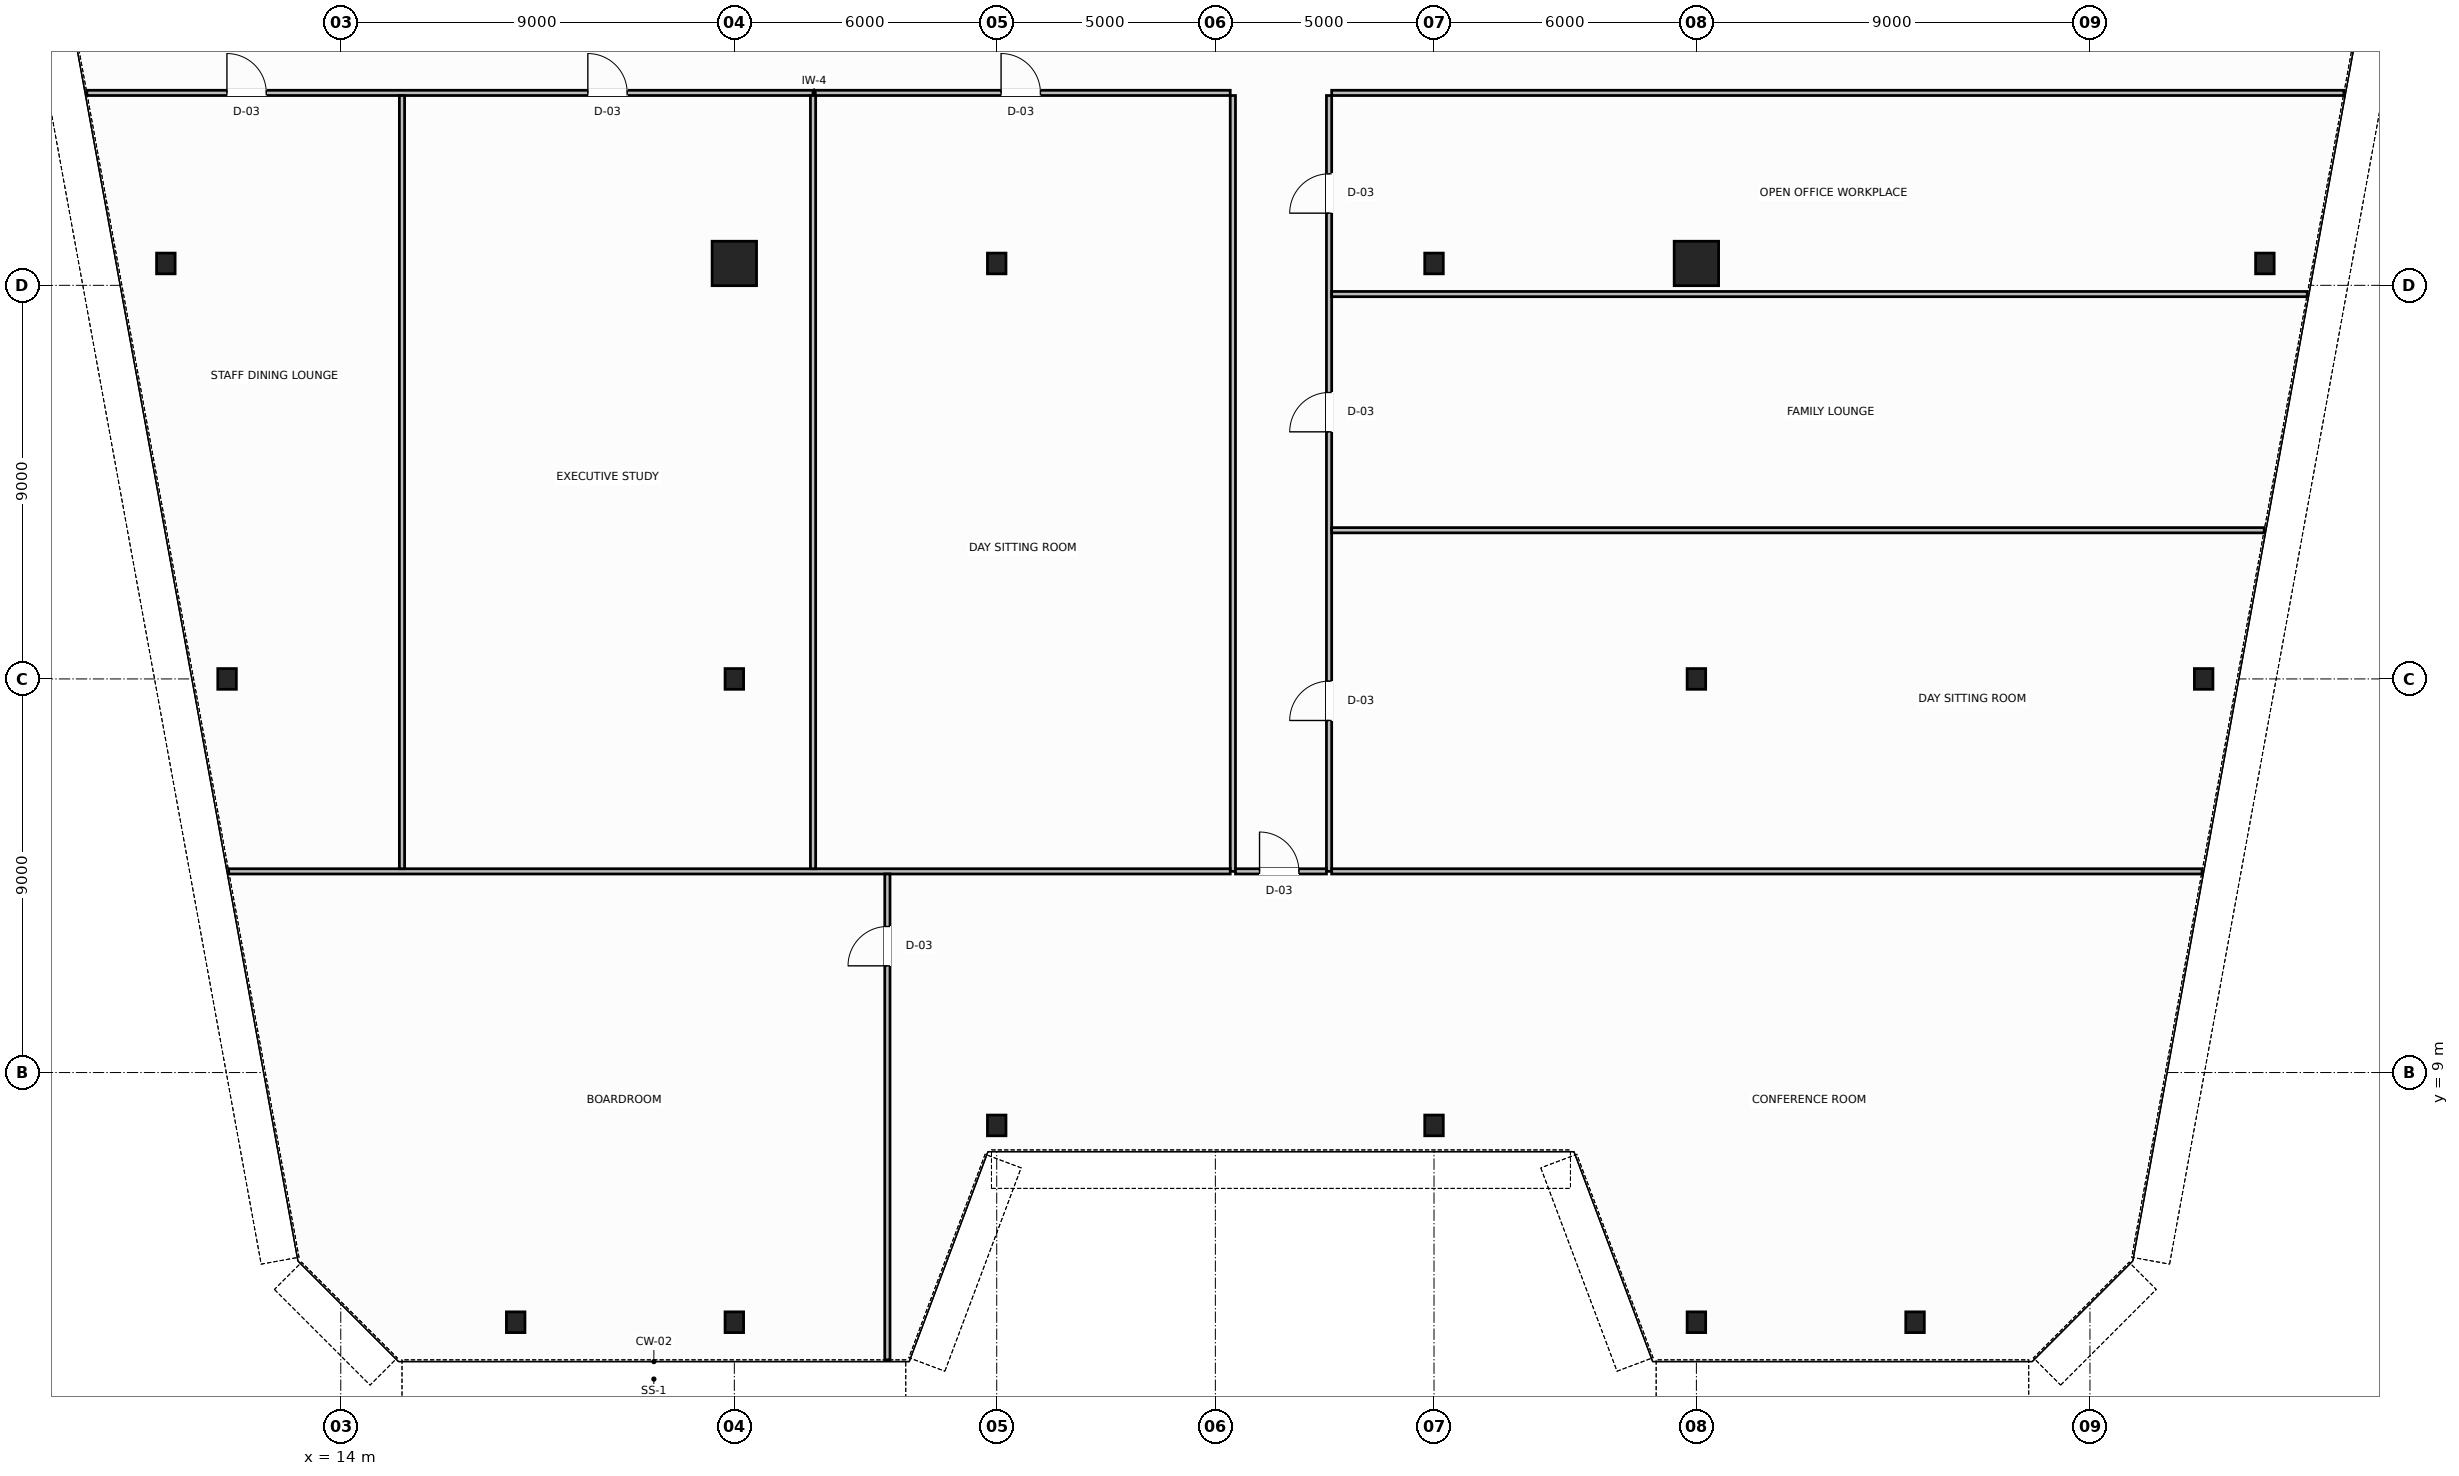
"""IFC4 building model, lengths in metres.
Left out: names, types, materials, properties, quantities, classifications, styles, units other than length and angle.
Written with IfcOpenShell. Run it as: python <this file> out.ifc"""

import sys

from ifc_helpers import new_model, si_unit, direction, frame, frame_2d, origin, origin_2d, place, context, subcontext, project, spatial, rectangle, hollow_circle, i_section, extrude, source, transform, mapped, element, fill, save


model = new_model("IFC4")
c1 = context("Model", 3, precision=1e-05, world=origin(), true_north=direction((0.0, 1.0)))
c2 = subcontext(c1, "Body", "Model", "MODEL_VIEW")
j1 = project(units=[si_unit("LENGTHUNIT", "METRE"), si_unit("PLANEANGLEUNIT", "RADIAN")], contexts=[c1])
p1 = place(None, origin())
s1 = spatial("IfcSite", under=j1, at=p1, CompositionType="ELEMENT")
p2 = place(p1, origin())
s2 = spatial("IfcBuilding", under=s1, at=p2, CompositionType="ELEMENT")
p3 = place(p2, frame((0.0, 0.0, 107.2)))
s3 = spatial("IfcBuildingStorey", under=s2, at=p3, CompositionType="ELEMENT", Elevation=107.2)
m1 = source(origin(), c2, "Body", "SweptSolid", [
    extrude(i_section(OverallWidth=0.424, OverallDepth=0.474, WebThickness=0.047, FlangeThickness=0.065, FilletRadius=0.015, at=origin_2d()), origin(), (0.0, 0.0, 1.0), 3.8),
])
for number, where, z_axis, x_axis in (
    (1, (10.0, 27.5, 0.0), (0.0, 0.0, 1.0), (1.0, 0.0, 0.0)),
    (2, (11.4, 18.0, 0.0), (0.0, 0.0, 1.0), (1.0, 0.0, 0.0)),
    (3, (58.0, 27.5, 0.0), (0.0, 0.0, 1.0), (1.0, 0.0, 0.0)),
    (4, (56.6, 18.0, 0.0), (0.0, 0.0, 1.0), (1.0, 0.0, 0.0)),
):
    element("IfcColumn", number, at=place(p3, frame(where, z_axis=z_axis, x_axis=x_axis)), inside=s3, PredefinedType="COLUMN", context=c2, shape_type="MappedRepresentation", body=[
        mapped(m1, transform((0.0, 0.0, 0.0), scale=1.0)),
    ])
m2 = source(origin(), c2, "Body", "SweptSolid", [
    extrude(hollow_circle(Radius=0.508, WallThickness=0.045, at=origin_2d()), origin(), (0.0, 0.0, 1.0), 3.8),
])
p4 = place(p3, frame((23.0, 27.5, 0.0), z_axis=(0.0, 0.0, 1.0), x_axis=(1.0, 0.0, 0.0)))
e5 = element("IfcColumn", 5, at=p4, inside=s3, PredefinedType="COLUMN", context=c2, shape_type="MappedRepresentation", body=[
    mapped(m2, transform((0.0, 0.0, 0.0), scale=1.0)),
])
m3 = source(origin(), c2, "Body", "SweptSolid", [
    extrude(i_section(OverallWidth=0.424, OverallDepth=0.474, WebThickness=0.047, FlangeThickness=0.065, FilletRadius=0.015, at=origin_2d()), origin(), (0.0, 0.0, 1.0), 3.8),
])
for number, where, z_axis, x_axis in (
    (6, (29.0, 27.5, 0.0), (0.0, 0.0, 1.0), (1.0, 0.0, 0.0)),
    (7, (39.0, 27.5, 0.0), (0.0, 0.0, 1.0), (1.0, 0.0, 0.0)),
):
    element("IfcColumn", number, at=place(p3, frame(where, z_axis=z_axis, x_axis=x_axis)), inside=s3, PredefinedType="COLUMN", context=c2, shape_type="MappedRepresentation", body=[
        mapped(m3, transform((0.0, 0.0, 0.0), scale=1.0)),
    ])
p5 = place(p3, frame((45.0, 27.5, 0.0), z_axis=(0.0, 0.0, 1.0), x_axis=(1.0, 0.0, 0.0)))
e8 = element("IfcColumn", 8, at=p5, inside=s3, PredefinedType="COLUMN", context=c2, shape_type="MappedRepresentation", body=[
    mapped(m2, transform((0.0, 0.0, 0.0), scale=1.0)),
])
for number, where, z_axis, x_axis in (
    (9, (23.0, 18.0, 0.0), (0.0, 0.0, 1.0), (1.0, 0.0, 0.0)),
    (10, (45.0, 18.0, 0.0), (0.0, 0.0, 1.0), (1.0, 0.0, 0.0)),
):
    element("IfcColumn", number, at=place(p3, frame(where, z_axis=z_axis, x_axis=x_axis)), inside=s3, PredefinedType="COLUMN", context=c2, shape_type="MappedRepresentation", body=[
        mapped(m3, transform((0.0, 0.0, 0.0), scale=1.0)),
    ])
m4 = source(origin(), c2, "Body", "SweptSolid", [
    extrude(i_section(OverallWidth=0.424, OverallDepth=0.474, WebThickness=0.047, FlangeThickness=0.065, FilletRadius=0.015, at=origin_2d()), origin(), (0.0, 0.0, 1.0), 3.744),
])
for number, where, z_axis, x_axis in (
    (11, (18.0, 3.291, 0.032), (0.0, -0.064, 0.998), (1.0, 0.0, 0.0)),
    (12, (23.0, 3.291, 0.032), (0.0, -0.064, 0.998), (1.0, 0.0, 0.0)),
    (13, (29.0, 7.791, 0.032), (0.0, -0.064, 0.998), (1.0, 0.0, 0.0)),
    (14, (39.0, 7.791, 0.032), (0.0, -0.064, 0.998), (1.0, 0.0, 0.0)),
    (15, (45.0, 3.291, 0.032), (0.0, -0.064, 0.998), (1.0, 0.0, 0.0)),
    (16, (50.0, 3.291, 0.032), (0.0, -0.064, 0.998), (1.0, 0.0, 0.0)),
):
    element("IfcColumn", number, at=place(p3, frame(where, z_axis=z_axis, x_axis=x_axis)), inside=s3, PredefinedType="COLUMN", context=c2, shape_type="MappedRepresentation", body=[
        mapped(m4, transform((0.0, 0.0, 0.0), scale=1.0)),
    ])
p6 = place(p3, frame((8.193, 31.4, 0.0), z_axis=(0.0, 0.0, 1.0), x_axis=(1.0, 0.0, 0.0)))
e17 = element("IfcWall", 17, at=p6, inside=s3, PredefinedType="PARTITIONING", context=c2, shape_type="SweptSolid", body=[
    extrude(rectangle(XDim=26.147, YDim=0.12, at=frame_2d((13.074, 0.0))), origin(), (0.0, 0.0, 1.0), 3.58),
])
p7 = place(p6, frame((3.204, 0.0, 0.0)))
e18 = element("IfcOpeningElement", 18, at=p7, cuts=e17, PredefinedType="OPENING", context=c2, shape_type="SweptSolid", body=[
    extrude(rectangle(XDim=0.9, YDim=2.15, at=frame_2d((0.45, 1.075))), frame((0.0, 0.07, 0.0), z_axis=(0.0, -1.0, 0.0), x_axis=(1.0, 0.0, 0.0)), (0.0, 0.0, 1.0), 0.14),
])
p8 = place(p6, frame((11.457, 0.0, 0.0)))
e19 = element("IfcOpeningElement", 19, at=p8, cuts=e17, PredefinedType="OPENING", context=c2, shape_type="SweptSolid", body=[
    extrude(rectangle(XDim=0.9, YDim=2.15, at=frame_2d((0.45, 1.075))), frame((0.0, 0.07, 0.0), z_axis=(0.0, -1.0, 0.0), x_axis=(1.0, 0.0, 0.0)), (0.0, 0.0, 1.0), 0.14),
])
p9 = place(p6, frame((20.907, 0.0, 0.0)))
e20 = element("IfcOpeningElement", 20, at=p9, cuts=e17, PredefinedType="OPENING", context=c2, shape_type="SweptSolid", body=[
    extrude(rectangle(XDim=0.9, YDim=2.15, at=frame_2d((0.45, 1.075))), frame((0.0, 0.07, 0.0), z_axis=(0.0, -1.0, 0.0), x_axis=(1.0, 0.0, 0.0)), (0.0, 0.0, 1.0), 0.14),
])
p10 = place(p3, frame((36.66, 31.4, 0.0), z_axis=(0.0, 0.0, 1.0), x_axis=(1.0, 0.0, 0.0)))
e21 = element("IfcWall", 21, at=p10, inside=s3, PredefinedType="PARTITIONING", context=c2, shape_type="SweptSolid", body=[
    extrude(rectangle(XDim=23.147, YDim=0.12, at=frame_2d((11.574, 0.0))), origin(), (0.0, 0.0, 1.0), 3.58),
])
p11 = place(p3, frame((34.4, 13.6, 0.0), z_axis=(0.0, 0.0, 1.0), x_axis=(0.0, 1.0, 0.0)))
e22 = element("IfcWall", 22, at=p11, inside=s3, PredefinedType="PARTITIONING", context=c2, shape_type="SweptSolid", body=[
    extrude(rectangle(XDim=17.74, YDim=0.12, at=frame_2d((8.87, 0.0))), origin(), (0.0, 0.0, 1.0), 3.58),
])
p12 = place(p3, frame((36.6, 13.6, 0.0), z_axis=(0.0, 0.0, 1.0), x_axis=(0.0, 1.0, 0.0)))
e23 = element("IfcWall", 23, at=p12, inside=s3, PredefinedType="PARTITIONING", context=c2, shape_type="SweptSolid", body=[
    extrude(rectangle(XDim=17.74, YDim=0.12, at=frame_2d((8.87, 0.0))), origin(), (0.0, 0.0, 1.0), 3.58),
])
p13 = place(p12, frame((3.45, 0.0, 0.0)))
e24 = element("IfcOpeningElement", 24, at=p13, cuts=e23, PredefinedType="OPENING", context=c2, shape_type="SweptSolid", body=[
    extrude(rectangle(XDim=0.9, YDim=2.15, at=frame_2d((0.45, 1.075))), frame((0.0, 0.07, 0.0), z_axis=(0.0, -1.0, 0.0), x_axis=(1.0, 0.0, 0.0)), (0.0, 0.0, 1.0), 0.14),
])
p14 = place(p12, frame((10.05, 0.0, 0.0)))
e25 = element("IfcOpeningElement", 25, at=p14, cuts=e23, PredefinedType="OPENING", context=c2, shape_type="SweptSolid", body=[
    extrude(rectangle(XDim=0.9, YDim=2.15, at=frame_2d((0.45, 1.075))), frame((0.0, 0.07, 0.0), z_axis=(0.0, -1.0, 0.0), x_axis=(1.0, 0.0, 0.0)), (0.0, 0.0, 1.0), 0.14),
])
p15 = place(p12, frame((15.05, 0.0, 0.0)))
e26 = element("IfcOpeningElement", 26, at=p15, cuts=e23, PredefinedType="OPENING", context=c2, shape_type="SweptSolid", body=[
    extrude(rectangle(XDim=0.9, YDim=2.15, at=frame_2d((0.45, 1.075))), frame((0.0, 0.07, 0.0), z_axis=(0.0, -1.0, 0.0), x_axis=(1.0, 0.0, 0.0)), (0.0, 0.0, 1.0), 0.14),
])
p16 = place(p3, frame((34.46, 13.6, 0.0), z_axis=(0.0, 0.0, 1.0), x_axis=(1.0, 0.0, 0.0)))
e27 = element("IfcWall", 27, at=p16, inside=s3, PredefinedType="PARTITIONING", context=c2, shape_type="SweptSolid", body=[
    extrude(rectangle(XDim=2.08, YDim=0.12, at=frame_2d((1.04, 0.0))), origin(), (0.0, 0.0, 1.0), 3.58),
])
p17 = place(p16, frame((0.55, 0.0, 0.0)))
e28 = element("IfcOpeningElement", 28, at=p17, cuts=e27, PredefinedType="OPENING", context=c2, shape_type="SweptSolid", body=[
    extrude(rectangle(XDim=0.9, YDim=2.15, at=frame_2d((0.45, 1.075))), frame((0.0, 0.07, 0.0), z_axis=(0.0, -1.0, 0.0), x_axis=(1.0, 0.0, 0.0)), (0.0, 0.0, 1.0), 0.14),
])
p18 = place(p3, frame((11.437, 13.6, 0.0), z_axis=(0.0, 0.0, 1.0), x_axis=(1.0, 0.0, 0.0)))
e29 = element("IfcWall", 29, at=p18, inside=s3, PredefinedType="PARTITIONING", context=c2, shape_type="SweptSolid", body=[
    extrude(rectangle(XDim=22.903, YDim=0.12, at=frame_2d((11.452, 0.0))), origin(), (0.0, 0.0, 1.0), 3.58),
])
p19 = place(p3, frame((36.66, 13.6, 0.0), z_axis=(0.0, 0.0, 1.0), x_axis=(1.0, 0.0, 0.0)))
e30 = element("IfcWall", 30, at=p19, inside=s3, PredefinedType="PARTITIONING", context=c2, shape_type="SweptSolid", body=[
    extrude(rectangle(XDim=19.903, YDim=0.12, at=frame_2d((9.952, 0.0))), origin(), (0.0, 0.0, 1.0), 3.58),
])
p20 = place(p3, frame((26.5, 2.431, 0.0), z_axis=(0.0, 0.0, 1.0), x_axis=(0.0, 1.0, 0.0)))
e31 = element("IfcWall", 31, at=p20, inside=s3, PredefinedType="PARTITIONING", context=c2, shape_type="SweptSolid", body=[
    extrude(rectangle(XDim=11.109, YDim=0.12, at=frame_2d((5.555, 0.0))), origin(), (0.0, 0.0, 1.0), 3.58),
])
p21 = place(p20, frame((9.009, 0.0, 0.0)))
e32 = element("IfcOpeningElement", 32, at=p21, cuts=e31, PredefinedType="OPENING", context=c2, shape_type="SweptSolid", body=[
    extrude(rectangle(XDim=0.9, YDim=2.15, at=frame_2d((0.45, 1.075))), frame((0.0, 0.07, 0.0), z_axis=(0.0, -1.0, 0.0), x_axis=(1.0, 0.0, 0.0)), (0.0, 0.0, 1.0), 0.14),
])
for number, where, z_axis, x_axis in (
    (33, (15.4, 13.66, 0.0), (0.0, 0.0, 1.0), (0.0, 1.0, 0.0)),
    (34, (24.8, 13.66, 0.0), (0.0, 0.0, 1.0), (0.0, 1.0, 0.0)),
):
    element("IfcWall", number, at=place(p3, frame(where, z_axis=z_axis, x_axis=x_axis)), inside=s3, PredefinedType="PARTITIONING", context=c2, shape_type="SweptSolid", body=[
        extrude(rectangle(XDim=17.68, YDim=0.12, at=frame_2d((8.84, 0.0))), origin(), (0.0, 0.0, 1.0), 3.58),
    ])
p22 = place(p3, frame((36.66, 21.4, 0.0), z_axis=(0.0, 0.0, 1.0), x_axis=(1.0, 0.0, 0.0)))
e35 = element("IfcWall", 35, at=p22, inside=s3, PredefinedType="PARTITIONING", context=c2, shape_type="SweptSolid", body=[
    extrude(rectangle(XDim=21.325, YDim=0.12, at=frame_2d((10.662, 0.0))), origin(), (0.0, 0.0, 1.0), 3.58),
])
p23 = place(p3, frame((36.66, 26.8, 0.0), z_axis=(0.0, 0.0, 1.0), x_axis=(1.0, 0.0, 0.0)))
e36 = element("IfcWall", 36, at=p23, inside=s3, PredefinedType="PARTITIONING", context=c2, shape_type="SweptSolid", body=[
    extrude(rectangle(XDim=22.309, YDim=0.12, at=frame_2d((11.154, 0.0))), origin(), (0.0, 0.0, 1.0), 3.58),
])
m5 = source(origin(), c2, "Body", "SweptSolid", [
    extrude(rectangle(XDim=0.9, YDim=2.15, at=frame_2d((0.45, 1.075))), frame((0.0, 0.025, 0.0), z_axis=(0.0, -1.0, 0.0), x_axis=(1.0, 0.0, 0.0)), (0.0, 0.0, 1.0), 0.05),
])
p24 = place(p21, origin())
e37 = element("IfcDoor", 37, at=p24, inside=s3, OperationType="SINGLE_SWING_RIGHT", PredefinedType="DOOR", context=c2, shape_type="MappedRepresentation", body=[
    mapped(m5, transform((0.0, 0.0, 0.0), scale=1.0)),
])
fill(e32, e37)
p25 = place(p17, origin())
e38 = element("IfcDoor", 38, at=p25, inside=s3, OperationType="SINGLE_SWING_LEFT", PredefinedType="DOOR", context=c2, shape_type="MappedRepresentation", body=[
    mapped(m5, transform((0.0, 0.0, 0.0), scale=1.0)),
])
fill(e28, e38)
p26 = place(p7, origin())
e39 = element("IfcDoor", 39, at=p26, inside=s3, OperationType="SINGLE_SWING_LEFT", PredefinedType="DOOR", context=c2, shape_type="MappedRepresentation", body=[
    mapped(m5, transform((0.0, 0.0, 0.0), scale=1.0)),
])
fill(e18, e39)
p27 = place(p8, origin())
e40 = element("IfcDoor", 40, at=p27, inside=s3, OperationType="SINGLE_SWING_RIGHT", PredefinedType="DOOR", context=c2, shape_type="MappedRepresentation", body=[
    mapped(m5, transform((0.0, 0.0, 0.0), scale=1.0)),
])
fill(e19, e40)
p28 = place(p9, origin())
e41 = element("IfcDoor", 41, at=p28, inside=s3, OperationType="SINGLE_SWING_LEFT", PredefinedType="DOOR", context=c2, shape_type="MappedRepresentation", body=[
    mapped(m5, transform((0.0, 0.0, 0.0), scale=1.0)),
])
fill(e20, e41)
p29 = place(p13, origin())
e42 = element("IfcDoor", 42, at=p29, inside=s3, OperationType="SINGLE_SWING_RIGHT", PredefinedType="DOOR", context=c2, shape_type="MappedRepresentation", body=[
    mapped(m5, transform((0.0, 0.0, 0.0), scale=1.0)),
])
fill(e24, e42)
p30 = place(p14, origin())
e43 = element("IfcDoor", 43, at=p30, inside=s3, OperationType="SINGLE_SWING_LEFT", PredefinedType="DOOR", context=c2, shape_type="MappedRepresentation", body=[
    mapped(m5, transform((0.0, 0.0, 0.0), scale=1.0)),
])
fill(e25, e43)
p31 = place(p15, origin())
e44 = element("IfcDoor", 44, at=p31, inside=s3, OperationType="SINGLE_SWING_RIGHT", PredefinedType="DOOR", context=c2, shape_type="MappedRepresentation", body=[
    mapped(m5, transform((0.0, 0.0, 0.0), scale=1.0)),
])
fill(e26, e44)
save(model, sys.argv[1])
